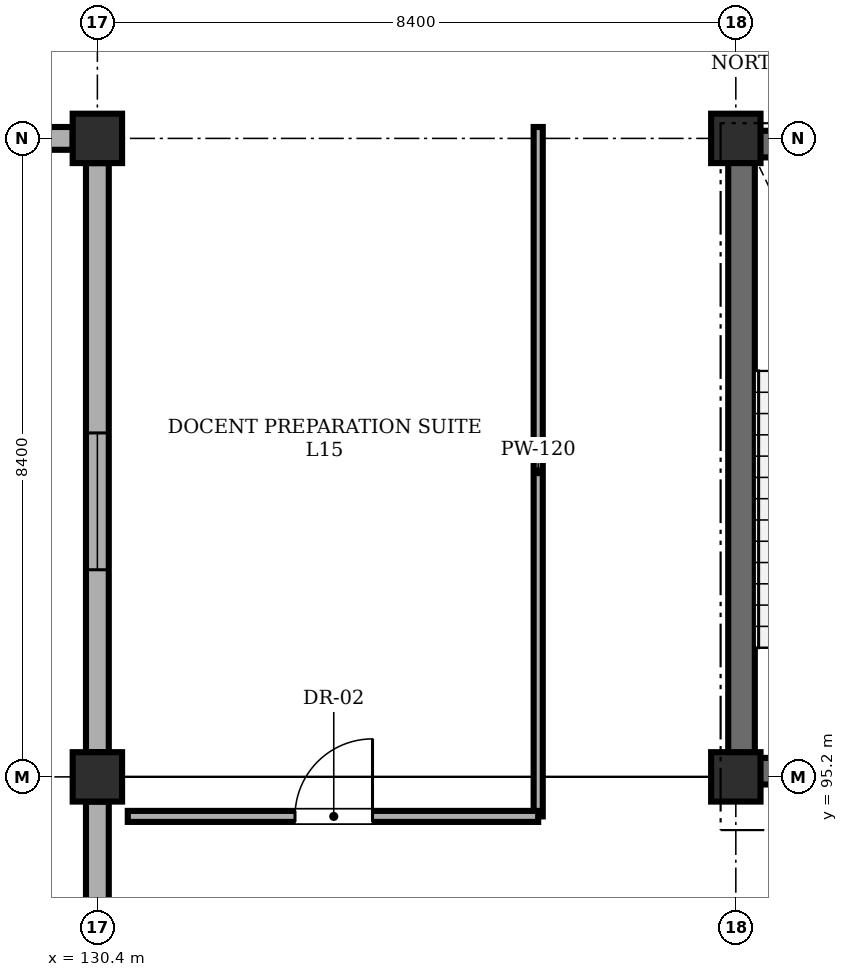
"""IFC4 building model, lengths in metres.
Left out: names, types, materials, properties, quantities, classifications, styles, units other than length and angle.
Written with IfcOpenShell. Run it as: python <this file> out.ifc"""

import sys

from ifc_helpers import new_model, si_unit, direction, frame, frame_2d, origin, origin_2d, place, context, subcontext, project, spatial, rectangle, extrude, element, fill, save


model = new_model("IFC4")
c1 = context("Model", 3, precision=1e-05, world=origin(), true_north=direction((0.0, 1.0)))
c2 = subcontext(c1, "Body", "Model", "MODEL_VIEW")
j1 = project(units=[si_unit("LENGTHUNIT", "METRE"), si_unit("PLANEANGLEUNIT", "RADIAN")], contexts=[c1])
p1 = place(None, origin())
s1 = spatial("IfcSite", under=j1, at=p1, CompositionType="ELEMENT")
p2 = place(p1, origin())
s2 = spatial("IfcBuilding", under=s1, at=p2, CompositionType="ELEMENT")
p3 = place(p2, frame((0.0, 0.0, 61.2)))
s3 = spatial("IfcBuildingStorey", under=s2, at=p3, CompositionType="ELEMENT", Elevation=61.2)
for number, where, z_axis, x_axis in (
    (1, (130.4, 95.2, 0.0), (0.0, 0.0, 1.0), (1.0, 0.0, 0.0)),
    (2, (130.4, 103.6, 0.0), (0.0, 0.0, 1.0), (1.0, 0.0, 0.0)),
    (3, (138.8, 95.2, 0.0), (0.0, 0.0, 1.0), (1.0, 0.0, 0.0)),
    (4, (138.8, 103.6, 0.0), (0.0, 0.0, 1.0), (1.0, 0.0, 0.0)),
):
    element("IfcColumn", number, at=place(p3, frame(where, z_axis=z_axis, x_axis=x_axis)), inside=s3, PredefinedType="COLUMN", context=c2, shape_type="SweptSolid", body=[
        extrude(rectangle(XDim=0.65, YDim=0.65, at=origin_2d()), origin(), (0.0, 0.0, 1.0), 4.28),
    ])
for number, where, z_axis, x_axis in (
    (5, (138.7, 95.275, 0.0), (0.0, 0.0, 1.0), (1.0, 0.0, 0.0)),
    (6, (138.7, 103.525, 0.0), (0.0, 0.0, 1.0), (1.0, 0.0, 0.0)),
):
    element("IfcWall", number, at=place(p3, frame(where, z_axis=z_axis, x_axis=x_axis)), inside=s3, PredefinedType="SHEAR", context=c2, shape_type="SweptSolid", body=[
        extrude(rectangle(XDim=3.8, YDim=0.35, at=frame_2d((1.9, 0.0))), origin(), (0.0, 0.0, 1.0), 4.28),
    ])
p4 = place(p3, frame((138.875, 95.45, 0.0), z_axis=(0.0, 0.0, 1.0), x_axis=(0.0, 1.0, 0.0)))
e7 = element("IfcWall", 7, at=p4, inside=s3, PredefinedType="SHEAR", context=c2, shape_type="SweptSolid", body=[
    extrude(rectangle(XDim=7.9, YDim=0.35, at=frame_2d((3.95, 0.0))), origin(), (0.0, 0.0, 1.0), 4.28),
])
p5 = place(p3, frame((130.4, 92.15, 0.0), z_axis=(0.0, 0.0, 1.0), x_axis=(0.0, 1.0, 0.0)))
e8 = element("IfcWall", 8, at=p5, inside=s3, PredefinedType="STANDARD", context=c2, shape_type="SweptSolid", body=[
    extrude(rectangle(XDim=2.725, YDim=0.3, at=frame_2d((1.363, 0.0))), origin(), (0.0, 0.0, 1.0), 4.28),
])
p6 = place(p3, frame((130.4, 95.525, 0.0), z_axis=(0.0, 0.0, 1.0), x_axis=(0.0, 1.0, 0.0)))
e9 = element("IfcWall", 9, at=p6, inside=s3, PredefinedType="STANDARD", context=c2, shape_type="SweptSolid", body=[
    extrude(rectangle(XDim=7.75, YDim=0.3, at=frame_2d((3.875, 0.0))), origin(), (0.0, 0.0, 1.0), 3.58),
])
p7 = place(p6, frame((2.4, 0.0, 1.0)))
e10 = element("IfcOpeningElement", 10, at=p7, cuts=e9, PredefinedType="OPENING", context=c2, shape_type="SweptSolid", body=[
    extrude(rectangle(XDim=1.8, YDim=1.8, at=frame_2d((0.9, 0.9))), frame((0.0, 0.16, 0.0), z_axis=(0.0, -1.0, 0.0), x_axis=(1.0, 0.0, 0.0)), (0.0, 0.0, 1.0), 0.32),
])
p8 = place(p3, frame((130.075, 103.6, 0.0), z_axis=(0.0, 0.0, 1.0), x_axis=(-1.0, 0.0, 0.0)))
e11 = element("IfcWall", 11, at=p8, inside=s3, PredefinedType="STANDARD", context=c2, shape_type="SweptSolid", body=[
    extrude(rectangle(XDim=7.7, YDim=0.3, at=frame_2d((3.85, 0.0))), origin(), (0.0, 0.0, 1.0), 3.58),
])
p9 = place(p3, frame((136.2, 94.68, 0.0), z_axis=(0.0, 0.0, 1.0), x_axis=(0.0, 1.0, 0.0)))
e12 = element("IfcWall", 12, at=p9, inside=s3, PredefinedType="PARTITIONING", context=c2, shape_type="SweptSolid", body=[
    extrude(rectangle(XDim=9.07, YDim=0.12, at=frame_2d((4.535, 0.0))), origin(), (0.0, 0.0, 1.0), 4.28),
])
p10 = place(p3, frame((130.8, 94.68, 0.0), z_axis=(0.0, 0.0, 1.0), x_axis=(1.0, 0.0, 0.0)))
e13 = element("IfcWall", 13, at=p10, inside=s3, PredefinedType="PARTITIONING", context=c2, shape_type="SweptSolid", body=[
    extrude(rectangle(XDim=5.4, YDim=0.145, at=frame_2d((2.7, 0.0))), origin(), (0.0, 0.0, 1.0), 4.28),
])
p11 = place(p10, frame((2.2, 0.0, 0.0)))
e14 = element("IfcOpeningElement", 14, at=p11, cuts=e13, PredefinedType="OPENING", context=c2, shape_type="SweptSolid", body=[
    extrude(rectangle(XDim=1.02, YDim=2.15, at=frame_2d((0.51, 1.075))), frame((0.0, 0.083, 0.0), z_axis=(0.0, -1.0, 0.0), x_axis=(1.0, 0.0, 0.0)), (0.0, 0.0, 1.0), 0.165),
])
p12 = place(p7, origin())
e15 = element("IfcWindow", 15, at=p12, inside=s3, PartitioningType="DOUBLE_PANEL_VERTICAL", PredefinedType="WINDOW", context=c2, shape_type="SweptSolid", body=[
    extrude(rectangle(XDim=1.8, YDim=1.8, at=frame_2d((0.9, 0.9))), frame((0.0, 0.03, 0.0), z_axis=(0.0, -1.0, 0.0), x_axis=(1.0, 0.0, 0.0)), (0.0, 0.0, 1.0), 0.06),
])
fill(e10, e15)
p13 = place(p11, origin())
e16 = element("IfcDoor", 16, at=p13, inside=s3, OperationType="SINGLE_SWING_RIGHT", PredefinedType="DOOR", context=c2, shape_type="SweptSolid", body=[
    extrude(rectangle(XDim=1.02, YDim=2.15, at=frame_2d((0.51, 1.075))), frame((0.0, 0.025, 0.0), z_axis=(0.0, -1.0, 0.0), x_axis=(1.0, 0.0, 0.0)), (0.0, 0.0, 1.0), 0.05),
])
fill(e14, e16)
save(model, sys.argv[1])
